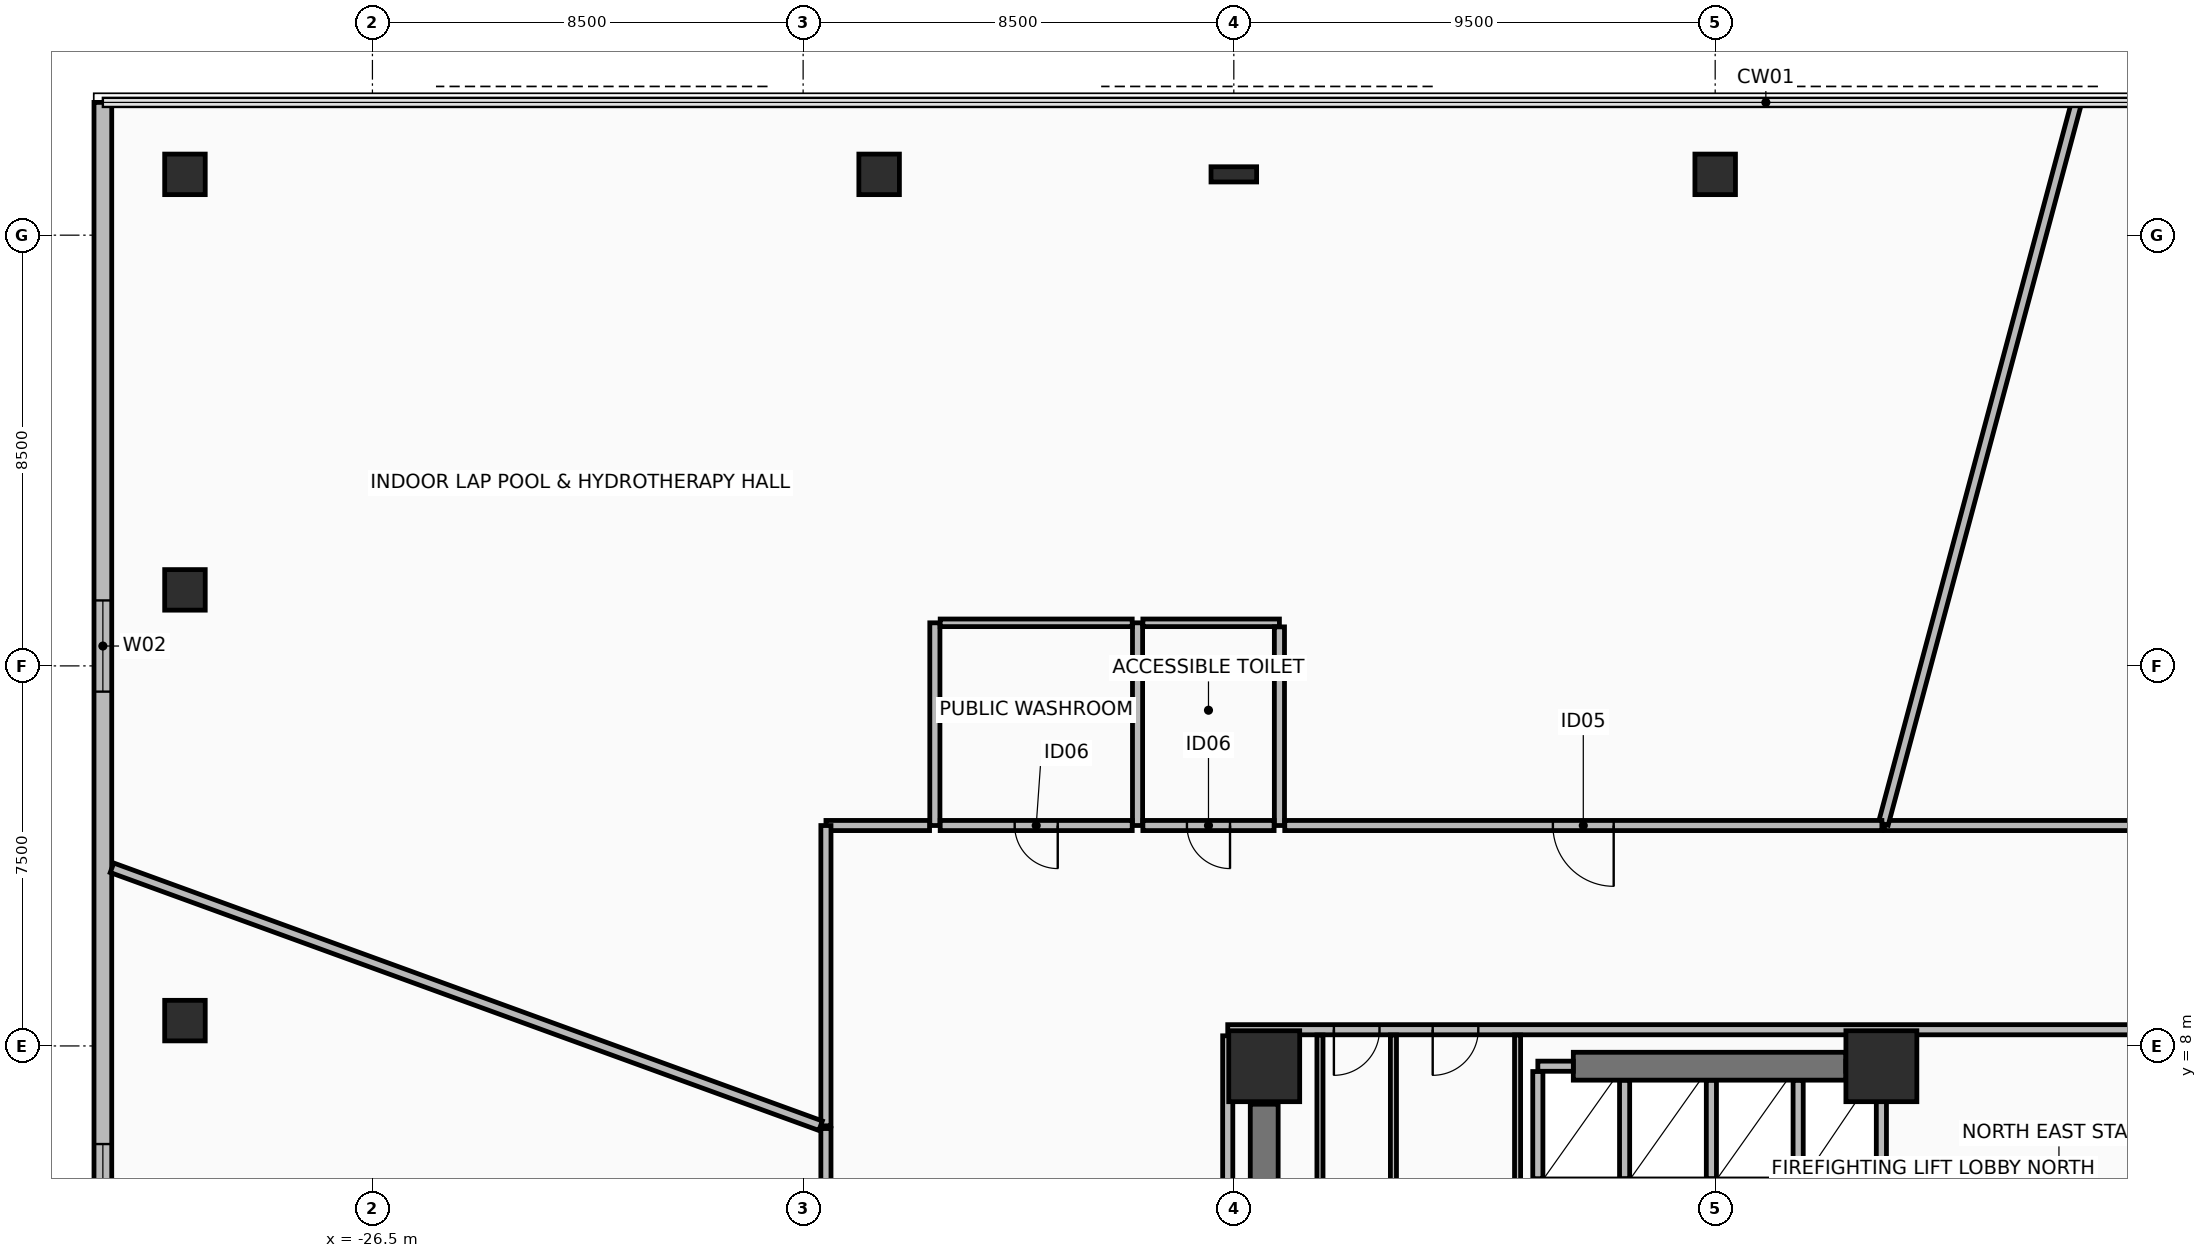
"""IFC4 building model, lengths in metres.
Left out: names, types, materials, properties, quantities, classifications, styles, units other than length and angle.
Written with IfcOpenShell. Run it as: python <this file> out.ifc"""

import sys

from ifc_helpers import new_model, si_unit, direction, frame, frame_2d, origin, origin_2d, place, context, subcontext, project, spatial, rectangle, hollow_rectangle, i_section, extrude, element, fill, save


model = new_model("IFC4")
c1 = context("Model", 3, precision=1e-05, world=origin(), true_north=direction((0.0, 1.0)))
c2 = subcontext(c1, "Body", "Model", "MODEL_VIEW")
j1 = project(units=[si_unit("LENGTHUNIT", "METRE"), si_unit("PLANEANGLEUNIT", "RADIAN")], contexts=[c1])
p1 = place(None, origin())
s1 = spatial("IfcSite", under=j1, at=p1, CompositionType="ELEMENT")
p2 = place(p1, origin())
s2 = spatial("IfcBuilding", under=s1, at=p2, CompositionType="ELEMENT")
p3 = place(p2, frame((0.0, 0.0, 21.5)))
s3 = spatial("IfcBuildingStorey", under=s2, at=p3, CompositionType="ELEMENT", Elevation=21.5)
for number, where, z_axis, x_axis in (
    (1, (3.28, 7.6, 0.0), (0.0, 0.0, 1.0), (1.0, 0.0, 0.0)),
    (2, (-8.9, 7.6, 0.0), (0.0, 0.0, 1.0), (1.0, 0.0, 0.0)),
):
    element("IfcColumn", number, at=place(p3, frame(where, z_axis=z_axis, x_axis=x_axis)), inside=s3, PredefinedType="COLUMN", context=c2, shape_type="SweptSolid", body=[
        extrude(rectangle(XDim=1.4, YDim=1.4, at=origin_2d()), origin(), (0.0, 0.0, 1.0), 5.0),
    ])
for number, where, z_axis, x_axis in (
    (3, (-30.2, 25.2, 0.0), (0.0, 0.0, 1.0), (1.0, 0.0, 0.0)),
    (4, (-16.5, 25.2, 0.0), (0.0, 0.0, 1.0), (1.0, 0.0, 0.0)),
):
    element("IfcColumn", number, at=place(p3, frame(where, z_axis=z_axis, x_axis=x_axis)), inside=s3, PredefinedType="COLUMN", context=c2, shape_type="SweptSolid", body=[
        extrude(hollow_rectangle(XDim=0.8, YDim=0.8, WallThickness=0.045, at=origin_2d()), origin(), (0.0, 0.0, 1.0), 5.0),
    ])
p4 = place(p3, frame((-9.5, 25.2, 0.0), z_axis=(0.0, 0.0, 1.0), x_axis=(1.0, 0.0, 0.0)))
e5 = element("IfcColumn", 5, at=p4, inside=s3, PredefinedType="COLUMN", context=c2, shape_type="SweptSolid", body=[
    extrude(i_section(OverallWidth=0.3, OverallDepth=0.9, WebThickness=0.019, FlangeThickness=0.035, at=origin_2d()), origin(), (0.0, 0.0, 1.0), 5.0),
])
for number, where, z_axis, x_axis in (
    (6, (0.0, 25.2, 0.0), (0.0, 0.0, 1.0), (1.0, 0.0, 0.0)),
    (7, (-30.2, 8.5, 0.0), (0.0, 0.0, 1.0), (1.0, 0.0, 0.0)),
    (8, (-30.2, 17.0, 0.0), (0.0, 0.0, 1.0), (1.0, 0.0, 0.0)),
):
    element("IfcColumn", number, at=place(p3, frame(where, z_axis=z_axis, x_axis=x_axis)), inside=s3, PredefinedType="COLUMN", context=c2, shape_type="SweptSolid", body=[
        extrude(hollow_rectangle(XDim=0.8, YDim=0.8, WallThickness=0.045, at=origin_2d()), origin(), (0.0, 0.0, 1.0), 5.0),
    ])
p5 = place(p3, frame((-31.82, 26.62, 0.0), z_axis=(0.0, 0.0, 1.0), x_axis=(0.0, -1.0, 0.0)))
e9 = element("IfcWall", 9, at=p5, inside=s3, PredefinedType="STANDARD", context=c2, shape_type="SweptSolid", body=[
    extrude(rectangle(XDim=53.64, YDim=0.35, at=frame_2d((26.82, 0.0))), origin(), (0.0, 0.0, 1.0), 4.74),
])
p6 = place(p5, frame((9.828, 0.0, 0.95)))
e10 = element("IfcOpeningElement", 10, at=p6, cuts=e9, PredefinedType="OPENING", context=c2, shape_type="SweptSolid", body=[
    extrude(rectangle(XDim=1.8, YDim=2.2, at=frame_2d((0.9, 1.1))), frame((0.0, 0.185, 0.0), z_axis=(0.0, -1.0, 0.0), x_axis=(1.0, 0.0, 0.0)), (0.0, 0.0, 1.0), 0.37),
])
p7 = place(p5, frame((20.556, 0.0, 0.95)))
e11 = element("IfcOpeningElement", 11, at=p7, cuts=e9, PredefinedType="OPENING", context=c2, shape_type="SweptSolid", body=[
    extrude(rectangle(XDim=1.8, YDim=2.2, at=frame_2d((0.9, 1.1))), frame((0.0, 0.185, 0.0), z_axis=(0.0, -1.0, 0.0), x_axis=(1.0, 0.0, 0.0)), (0.0, 0.0, 1.0), 0.37),
])
p8 = place(p5, frame((31.284, 0.0, 0.95)))
e12 = element("IfcOpeningElement", 12, at=p8, cuts=e9, PredefinedType="OPENING", context=c2, shape_type="SweptSolid", body=[
    extrude(rectangle(XDim=1.8, YDim=2.2, at=frame_2d((0.9, 1.1))), frame((0.0, 0.185, 0.0), z_axis=(0.0, -1.0, 0.0), x_axis=(1.0, 0.0, 0.0)), (0.0, 0.0, 1.0), 0.37),
])
p9 = place(p5, frame((42.012, 0.0, 0.95)))
e13 = element("IfcOpeningElement", 13, at=p9, cuts=e9, PredefinedType="OPENING", context=c2, shape_type="SweptSolid", body=[
    extrude(rectangle(XDim=1.8, YDim=2.2, at=frame_2d((0.9, 1.1))), frame((0.0, 0.185, 0.0), z_axis=(0.0, -1.0, 0.0), x_axis=(1.0, 0.0, 0.0)), (0.0, 0.0, 1.0), 0.37),
])
p10 = place(p3, frame((-2.8, 7.6, 0.0), z_axis=(0.0, 0.0, 1.0), x_axis=(1.0, 0.0, 0.0)))
e14 = element("IfcWall", 14, at=p10, inside=s3, PredefinedType="SHEAR", context=c2, shape_type="SweptSolid", body=[
    extrude(rectangle(XDim=5.38, YDim=0.55, at=frame_2d((2.69, 0.0))), origin(), (0.0, 0.0, 1.0), 4.74),
])
p11 = place(p3, frame((-8.9, -3.85, 0.0), z_axis=(0.0, 0.0, 1.0), x_axis=(0.0, 1.0, 0.0)))
e15 = element("IfcWall", 15, at=p11, inside=s3, PredefinedType="SHEAR", context=c2, shape_type="SweptSolid", body=[
    extrude(rectangle(XDim=10.7, YDim=0.55, at=frame_2d((5.35, 0.0))), origin(), (0.0, 0.0, 1.0), 4.74),
])
p12 = place(p3, frame((9.62, 8.32, 0.0), z_axis=(0.0, 0.0, 1.0), x_axis=(-1.0, 0.0, 0.0)))
e16 = element("IfcWall", 16, at=p12, inside=s3, PredefinedType="PARTITIONING", context=c2, shape_type="SweptSolid", body=[
    extrude(rectangle(XDim=19.24, YDim=0.2, at=frame_2d((9.62, 0.0))), origin(), (0.0, 0.0, 1.0), 3.135),
])
p13 = place(p12, frame((16.245, 0.0, 0.0)))
e17 = element("IfcOpeningElement", 17, at=p13, cuts=e16, PredefinedType="OPENING", context=c2, shape_type="SweptSolid", body=[
    extrude(rectangle(XDim=0.9, YDim=2.1, at=frame_2d((0.45, 1.05))), frame((0.0, 0.11, 0.0), z_axis=(0.0, -1.0, 0.0), x_axis=(1.0, 0.0, 0.0)), (0.0, 0.0, 1.0), 0.22),
])
p14 = place(p12, frame((14.295, 0.0, 0.0)))
e18 = element("IfcOpeningElement", 18, at=p14, cuts=e16, PredefinedType="OPENING", context=c2, shape_type="SweptSolid", body=[
    extrude(rectangle(XDim=0.9, YDim=2.1, at=frame_2d((0.45, 1.05))), frame((0.0, 0.11, 0.0), z_axis=(0.0, -1.0, 0.0), x_axis=(1.0, 0.0, 0.0)), (0.0, 0.0, 1.0), 0.22),
])
p15 = place(p3, frame((-9.62, 8.2, 0.0), z_axis=(0.0, 0.0, 1.0), x_axis=(0.0, -1.0, 0.0)))
e19 = element("IfcWall", 19, at=p15, inside=s3, PredefinedType="PARTITIONING", context=c2, shape_type="SweptSolid", body=[
    extrude(rectangle(XDim=16.4, YDim=0.2, at=frame_2d((8.2, 0.0))), origin(), (0.0, 0.0, 1.0), 3.135),
])
p16 = place(p15, frame((12.65, 0.0, 0.0)))
e20 = element("IfcOpeningElement", 20, at=p16, cuts=e19, PredefinedType="OPENING", context=c2, shape_type="SweptSolid", body=[
    extrude(rectangle(XDim=1.1, YDim=2.15, at=frame_2d((0.55, 1.075))), frame((0.0, 0.11, 0.0), z_axis=(0.0, -1.0, 0.0), x_axis=(1.0, 0.0, 0.0)), (0.0, 0.0, 1.0), 0.22),
])
p17 = place(p3, frame((-3.5, 7.6, 0.0), z_axis=(0.0, 0.0, 1.0), x_axis=(1.0, 0.0, 0.0)))
e21 = element("IfcWall", 21, at=p17, inside=s3, PredefinedType="PARTITIONING", context=c2, shape_type="SweptSolid", body=[
    extrude(rectangle(XDim=0.7, YDim=0.2, at=frame_2d((0.35, 0.0))), origin(), (0.0, 0.0, 1.0), 3.935),
])
p18 = place(p3, frame((-3.5, 5.38, 0.0), z_axis=(0.0, 0.0, 1.0), x_axis=(0.0, 1.0, 0.0)))
e22 = element("IfcWall", 22, at=p18, inside=s3, PredefinedType="PARTITIONING", context=c2, shape_type="SweptSolid", body=[
    extrude(rectangle(XDim=2.115, YDim=0.2, at=frame_2d((1.058, 0.0))), origin(), (0.0, 0.0, 1.0), 3.935),
])
for number, where, z_axis, x_axis in (
    (23, (-1.788, 5.38, 0.0), (0.0, 0.0, 1.0), (0.0, 1.0, 0.0)),
    (24, (-0.075, 5.38, 0.0), (0.0, 0.0, 1.0), (0.0, 1.0, 0.0)),
    (25, (1.637, 5.38, 0.0), (0.0, 0.0, 1.0), (0.0, 1.0, 0.0)),
):
    element("IfcWall", number, at=place(p3, frame(where, z_axis=z_axis, x_axis=x_axis)), inside=s3, PredefinedType="PARTITIONING", context=c2, shape_type="SweptSolid", body=[
        extrude(rectangle(XDim=1.94, YDim=0.2, at=frame_2d((0.97, 0.0))), origin(), (0.0, 0.0, 1.0), 4.74),
    ])
p19 = place(p3, frame((2.58, 7.6, 0.0), z_axis=(0.0, 0.0, 1.0), x_axis=(1.0, 0.0, 0.0)))
e26 = element("IfcWall", 26, at=p19, inside=s3, PredefinedType="PARTITIONING", context=c2, shape_type="SweptSolid", body=[
    extrude(rectangle(XDim=0.7, YDim=0.2, at=frame_2d((0.35, 0.0))), origin(), (0.0, 0.0, 1.0), 3.135),
])
p20 = place(p3, frame((3.28, 5.38, 0.0), z_axis=(0.0, 0.0, 1.0), x_axis=(0.0, 1.0, 0.0)))
e27 = element("IfcWall", 27, at=p20, inside=s3, PredefinedType="PARTITIONING", context=c2, shape_type="SweptSolid", body=[
    extrude(rectangle(XDim=2.115, YDim=0.2, at=frame_2d((1.058, 0.0))), origin(), (0.0, 0.0, 1.0), 3.135),
])
for number, where, z_axis, x_axis in (
    (28, (-6.35, 4.265, 0.0), (0.0, 0.0, 1.0), (0.0, 1.0, 0.0)),
    (29, (-7.8, 8.215, 0.0), (0.0, 0.0, 1.0), (0.0, -1.0, 0.0)),
    (30, (-3.9, 4.265, 0.0), (0.0, 0.0, 1.0), (0.0, 1.0, 0.0)),
):
    element("IfcWall", number, at=place(p3, frame(where, z_axis=z_axis, x_axis=x_axis)), inside=s3, PredefinedType="PARTITIONING", context=c2, shape_type="SweptSolid", body=[
        extrude(rectangle(XDim=3.95, YDim=0.12, at=frame_2d((1.975, 0.0))), origin(), (0.0, 0.0, 1.0), 3.935),
    ])
p21 = place(p3, frame((-11.4, 12.35, 0.0), z_axis=(0.0, 0.0, 1.0), x_axis=(0.0, 1.0, 0.0)))
e31 = element("IfcWall", 31, at=p21, inside=s3, PredefinedType="PARTITIONING", context=c2, shape_type="SweptSolid", body=[
    extrude(rectangle(XDim=4.0, YDim=0.2, at=frame_2d((2.0, 0.0))), origin(), (0.0, 0.0, 1.0), 4.285),
])
p22 = place(p3, frame((-11.295, 16.35, 0.0), z_axis=(0.0, 0.0, 1.0), x_axis=(1.0, 0.0, 0.0)))
e32 = element("IfcWall", 32, at=p22, inside=s3, PredefinedType="PARTITIONING", context=c2, shape_type="SweptSolid", body=[
    extrude(rectangle(XDim=2.695, YDim=0.15, at=frame_2d((1.347, 0.0))), origin(), (0.0, 0.0, 1.0), 3.135),
])
p23 = place(p3, frame((-8.6, 16.27, 0.0), z_axis=(0.0, 0.0, 1.0), x_axis=(0.0, -1.0, 0.0)))
e33 = element("IfcWall", 33, at=p23, inside=s3, PredefinedType="PARTITIONING", context=c2, shape_type="SweptSolid", body=[
    extrude(rectangle(XDim=3.92, YDim=0.2, at=frame_2d((1.96, 0.0))), origin(), (0.0, 0.0, 1.0), 3.135),
])
p24 = place(p3, frame((-8.705, 12.35, 0.0), z_axis=(0.0, 0.0, 1.0), x_axis=(-1.0, 0.0, 0.0)))
e34 = element("IfcWall", 34, at=p24, inside=s3, PredefinedType="PARTITIONING", context=c2, shape_type="SweptSolid", body=[
    extrude(rectangle(XDim=2.59, YDim=0.2, at=frame_2d((1.295, 0.0))), origin(), (0.0, 0.0, 1.0), 3.135),
])
p25 = place(p24, frame((0.87, 0.0, 0.0)))
e35 = element("IfcOpeningElement", 35, at=p25, cuts=e34, PredefinedType="OPENING", context=c2, shape_type="SweptSolid", body=[
    extrude(rectangle(XDim=0.85, YDim=2.1, at=frame_2d((0.425, 1.05))), frame((0.0, 0.11, 0.0), z_axis=(0.0, -1.0, 0.0), x_axis=(1.0, 0.0, 0.0)), (0.0, 0.0, 1.0), 0.22),
])
p26 = place(p3, frame((-15.4, 12.35, 0.0), z_axis=(0.0, 0.0, 1.0), x_axis=(0.0, 1.0, 0.0)))
e36 = element("IfcWall", 36, at=p26, inside=s3, PredefinedType="PARTITIONING", context=c2, shape_type="SweptSolid", body=[
    extrude(rectangle(XDim=4.0, YDim=0.2, at=frame_2d((2.0, 0.0))), origin(), (0.0, 0.0, 1.0), 4.285),
])
p27 = place(p3, frame((-15.295, 16.35, 0.0), z_axis=(0.0, 0.0, 1.0), x_axis=(1.0, 0.0, 0.0)))
e37 = element("IfcWall", 37, at=p27, inside=s3, PredefinedType="PARTITIONING", context=c2, shape_type="SweptSolid", body=[
    extrude(rectangle(XDim=3.79, YDim=0.15, at=frame_2d((1.895, 0.0))), origin(), (0.0, 0.0, 1.0), 4.74),
])
p28 = place(p3, frame((-11.505, 12.35, 0.0), z_axis=(0.0, 0.0, 1.0), x_axis=(-1.0, 0.0, 0.0)))
e38 = element("IfcWall", 38, at=p28, inside=s3, PredefinedType="PARTITIONING", context=c2, shape_type="SweptSolid", body=[
    extrude(rectangle(XDim=3.79, YDim=0.2, at=frame_2d((1.895, 0.0))), origin(), (0.0, 0.0, 1.0), 4.74),
])
p29 = place(p28, frame((1.47, 0.0, 0.0)))
e39 = element("IfcOpeningElement", 39, at=p29, cuts=e38, PredefinedType="OPENING", context=c2, shape_type="SweptSolid", body=[
    extrude(rectangle(XDim=0.85, YDim=2.1, at=frame_2d((0.425, 1.05))), frame((0.0, 0.11, 0.0), z_axis=(0.0, -1.0, 0.0), x_axis=(1.0, 0.0, 0.0)), (0.0, 0.0, 1.0), 0.22),
])
p30 = place(p3, frame((17.525, 12.35, 0.0), z_axis=(0.0, 0.0, 1.0), x_axis=(-1.0, 0.0, 0.0)))
e40 = element("IfcWall", 40, at=p30, inside=s3, PredefinedType="PARTITIONING", context=c2, shape_type="SweptSolid", body=[
    extrude(rectangle(XDim=14.183, YDim=0.2, at=frame_2d((7.092, 0.0))), origin(), (0.0, 0.0, 1.0), 3.135),
])
p31 = place(p30, frame((6.492, 0.0, 0.0)))
e41 = element("IfcOpeningElement", 41, at=p31, cuts=e40, PredefinedType="OPENING", context=c2, shape_type="SweptSolid", body=[
    extrude(rectangle(XDim=1.2, YDim=2.15, at=frame_2d((0.6, 1.075))), frame((0.0, 0.11, 0.0), z_axis=(0.0, -1.0, 0.0), x_axis=(1.0, 0.0, 0.0)), (0.0, 0.0, 1.0), 0.22),
])
p32 = place(p3, frame((3.318, 12.382, 0.0), z_axis=(0.0, 0.0, 1.0), x_axis=(0.258808202965, 0.965928731366, 0.0)))
e42 = element("IfcWall", 42, at=p32, inside=s3, PredefinedType="PARTITIONING", context=c2, shape_type="SweptSolid", body=[
    extrude(rectangle(XDim=14.721, YDim=0.2, at=frame_2d((7.361, 0.0))), origin(), (0.0, 0.0, 1.0), 3.135),
])
p33 = place(p3, frame((3.29, 12.35, 0.0), z_axis=(0.0, 0.0, 1.0), x_axis=(-1.0, 0.0, 0.0)))
e43 = element("IfcWall", 43, at=p33, inside=s3, PredefinedType="PARTITIONING", context=c2, shape_type="SweptSolid", body=[
    extrude(rectangle(XDim=11.785, YDim=0.2, at=frame_2d((5.893, 0.0))), origin(), (0.0, 0.0, 1.0), 3.135),
])
p34 = place(p33, frame((5.293, 0.0, 0.0)))
e44 = element("IfcOpeningElement", 44, at=p34, cuts=e43, PredefinedType="OPENING", context=c2, shape_type="SweptSolid", body=[
    extrude(rectangle(XDim=1.2, YDim=2.15, at=frame_2d((0.6, 1.075))), frame((0.0, 0.11, 0.0), z_axis=(0.0, -1.0, 0.0), x_axis=(1.0, 0.0, 0.0)), (0.0, 0.0, 1.0), 0.22),
])
p35 = place(p3, frame((-15.505, 12.35, 0.0), z_axis=(0.0, 0.0, 1.0), x_axis=(-1.0, 0.0, 0.0)))
e45 = element("IfcWall", 45, at=p35, inside=s3, PredefinedType="PARTITIONING", context=c2, shape_type="SweptSolid", body=[
    extrude(rectangle(XDim=2.044, YDim=0.2, at=frame_2d((1.022, 0.0))), origin(), (0.0, 0.0, 1.0), 3.135),
])
p36 = place(p3, frame((-17.55, 12.349, 0.0), z_axis=(0.0, 0.0, 1.0), x_axis=(0.0, -1.0, 0.0)))
e46 = element("IfcWall", 46, at=p36, inside=s3, PredefinedType="PARTITIONING", context=c2, shape_type="SweptSolid", body=[
    extrude(rectangle(XDim=5.926, YDim=0.2, at=frame_2d((2.963, 0.0))), origin(), (0.0, 0.0, 1.0), 3.135),
])
p37 = place(p3, frame((-17.655, 6.426, 0.0), z_axis=(0.0, 0.0, 1.0), x_axis=(-0.939687047594, 0.342035455157, 0.0)))
e47 = element("IfcWall", 47, at=p37, inside=s3, PredefinedType="PARTITIONING", context=c2, shape_type="SweptSolid", body=[
    extrude(rectangle(XDim=14.883, YDim=0.2, at=frame_2d((7.441, 0.0))), origin(), (0.0, 0.0, 1.0), 3.135),
])
p38 = place(p3, frame((-17.55, 6.37, 0.0), z_axis=(0.0, 0.0, 1.0), x_axis=(0.0, -1.0, 0.0)))
e48 = element("IfcWall", 48, at=p38, inside=s3, PredefinedType="PARTITIONING", context=c2, shape_type="SweptSolid", body=[
    extrude(rectangle(XDim=18.545, YDim=0.2, at=frame_2d((9.272, 0.0))), origin(), (0.0, 0.0, 1.0), 3.135),
])
p39 = place(p38, frame((8.673, 0.0, 0.0)))
e49 = element("IfcOpeningElement", 49, at=p39, cuts=e48, PredefinedType="OPENING", context=c2, shape_type="SweptSolid", body=[
    extrude(rectangle(XDim=1.2, YDim=2.15, at=frame_2d((0.6, 1.075))), frame((0.0, 0.11, 0.0), z_axis=(0.0, -1.0, 0.0), x_axis=(1.0, 0.0, 0.0)), (0.0, 0.0, 1.0), 0.22),
])
p40 = place(p6, origin())
e50 = element("IfcWindow", 50, at=p40, inside=s3, PartitioningType="SINGLE_PANEL", PredefinedType="WINDOW", context=c2, shape_type="SweptSolid", body=[
    extrude(rectangle(XDim=1.8, YDim=2.2, at=frame_2d((0.9, 1.1))), frame((0.0, 0.03, 0.0), z_axis=(0.0, -1.0, 0.0), x_axis=(1.0, 0.0, 0.0)), (0.0, 0.0, 1.0), 0.06),
])
fill(e10, e50)
p41 = place(p7, origin())
e51 = element("IfcWindow", 51, at=p41, inside=s3, PartitioningType="SINGLE_PANEL", PredefinedType="WINDOW", context=c2, shape_type="SweptSolid", body=[
    extrude(rectangle(XDim=1.8, YDim=2.2, at=frame_2d((0.9, 1.1))), frame((0.0, 0.03, 0.0), z_axis=(0.0, -1.0, 0.0), x_axis=(1.0, 0.0, 0.0)), (0.0, 0.0, 1.0), 0.06),
])
fill(e11, e51)
p42 = place(p13, frame((0.9, 0.0, 0.0), z_axis=(0.0, 0.0, 1.0), x_axis=(-1.0, 0.0, 0.0)))
e52 = element("IfcDoor", 52, at=p42, inside=s3, OperationType="SINGLE_SWING_LEFT", PredefinedType="DOOR", context=c2, shape_type="SweptSolid", body=[
    extrude(rectangle(XDim=0.9, YDim=2.1, at=frame_2d((0.45, 1.05))), frame((0.0, 0.025, 0.0), z_axis=(0.0, -1.0, 0.0), x_axis=(1.0, 0.0, 0.0)), (0.0, 0.0, 1.0), 0.05),
])
fill(e17, e52)
p43 = place(p14, frame((0.9, 0.0, 0.0), z_axis=(0.0, 0.0, 1.0), x_axis=(-1.0, 0.0, 0.0)))
e53 = element("IfcDoor", 53, at=p43, inside=s3, OperationType="SINGLE_SWING_LEFT", PredefinedType="DOOR", context=c2, shape_type="SweptSolid", body=[
    extrude(rectangle(XDim=0.9, YDim=2.1, at=frame_2d((0.45, 1.05))), frame((0.0, 0.025, 0.0), z_axis=(0.0, -1.0, 0.0), x_axis=(1.0, 0.0, 0.0)), (0.0, 0.0, 1.0), 0.05),
])
fill(e18, e53)
p44 = place(p25, origin())
e54 = element("IfcDoor", 54, at=p44, inside=s3, OperationType="SINGLE_SWING_RIGHT", PredefinedType="DOOR", context=c2, shape_type="SweptSolid", body=[
    extrude(rectangle(XDim=0.85, YDim=2.1, at=frame_2d((0.425, 1.05))), frame((0.0, 0.025, 0.0), z_axis=(0.0, -1.0, 0.0), x_axis=(1.0, 0.0, 0.0)), (0.0, 0.0, 1.0), 0.05),
])
fill(e35, e54)
p45 = place(p29, origin())
e55 = element("IfcDoor", 55, at=p45, inside=s3, OperationType="SINGLE_SWING_RIGHT", PredefinedType="DOOR", context=c2, shape_type="SweptSolid", body=[
    extrude(rectangle(XDim=0.85, YDim=2.1, at=frame_2d((0.425, 1.05))), frame((0.0, 0.025, 0.0), z_axis=(0.0, -1.0, 0.0), x_axis=(1.0, 0.0, 0.0)), (0.0, 0.0, 1.0), 0.05),
])
fill(e39, e55)
p46 = place(p34, origin())
e56 = element("IfcDoor", 56, at=p46, inside=s3, OperationType="SINGLE_SWING_LEFT", PredefinedType="DOOR", context=c2, shape_type="SweptSolid", body=[
    extrude(rectangle(XDim=1.2, YDim=2.15, at=frame_2d((0.6, 1.075))), frame((0.0, 0.025, 0.0), z_axis=(0.0, -1.0, 0.0), x_axis=(1.0, 0.0, 0.0)), (0.0, 0.0, 1.0), 0.05),
])
fill(e44, e56)
save(model, sys.argv[1])
